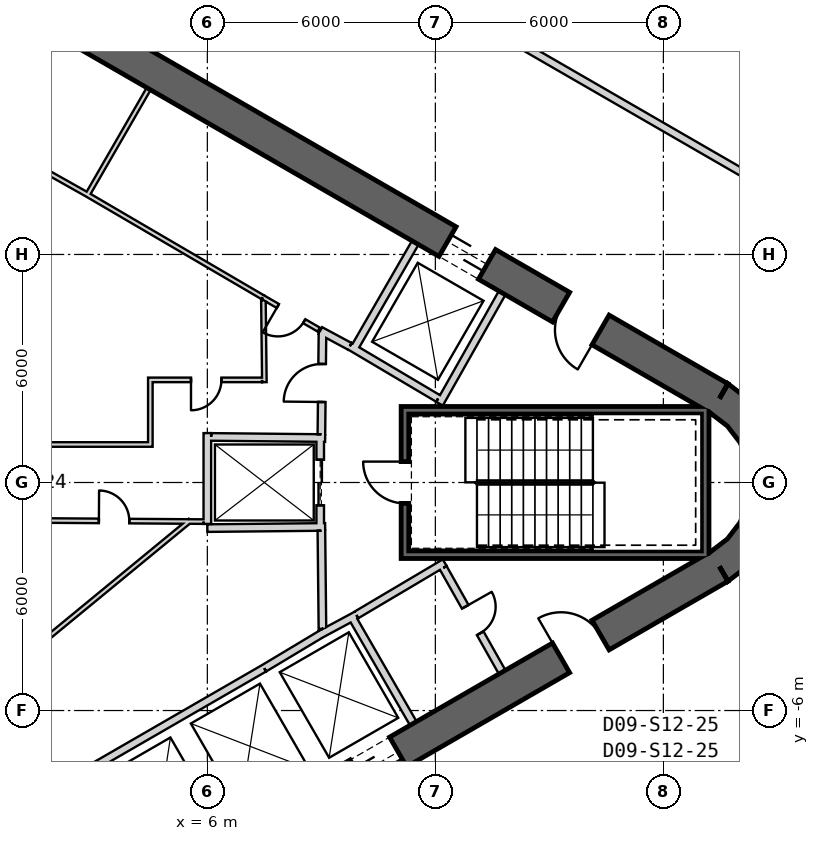
"""IFC4 building model, lengths in metres.
Left out: names, types, materials, properties, quantities, classifications, styles, units other than length and angle.
Written with IfcOpenShell. Run it as: python <this file> out.ifc"""

import sys

from ifc_helpers import new_model, si_unit, direction, frame, frame_2d, origin, place, context, subcontext, project, spatial, polyline, rectangle, outline, extrude, element, fill, save


model = new_model("IFC4")
c1 = context("Model", 3, precision=1e-05, world=origin(), true_north=direction((0.0, 1.0)))
c2 = subcontext(c1, "Body", "Model", "MODEL_VIEW")
j1 = project(units=[si_unit("LENGTHUNIT", "METRE"), si_unit("PLANEANGLEUNIT", "RADIAN")], contexts=[c1])
p1 = place(None, origin())
s1 = spatial("IfcSite", under=j1, at=p1, CompositionType="ELEMENT")
p2 = place(p1, origin())
s2 = spatial("IfcBuilding", under=s1, at=p2, CompositionType="ELEMENT")
p3 = place(p2, frame((0.0, 0.0, 205.2)))
s3 = spatial("IfcBuildingStorey", under=s2, at=p3, CompositionType="ELEMENT", Elevation=205.2)
p4 = place(p3, frame((19.475, 2.208, 0.0), z_axis=(0.0, 0.0, 1.0), x_axis=(-0.866028369851, 0.499994862586, 0.0)))
e1 = element("IfcWall", 1, at=p4, inside=s3, PredefinedType="SHEAR", context=c2, shape_type="SweptSolid", body=[
    extrude(rectangle(XDim=31.523, YDim=0.9, at=frame_2d((15.762, 0.0))), origin(), (0.0, 0.0, 1.0), 4.0),
])
p5 = place(p4, frame((7.062, 0.0, 0.0)))
e2 = element("IfcOpeningElement", 2, at=p5, cuts=e1, PredefinedType="OPENING", context=c2, shape_type="SweptSolid", body=[
    extrude(rectangle(XDim=1.2, YDim=2.4, at=frame_2d((0.6, 1.2))), frame((0.0, 0.46, 0.0), z_axis=(0.0, -1.0, 0.0), x_axis=(1.0, 0.0, 0.0)), (0.0, 0.0, 1.0), 0.92),
])
p6 = place(p4, frame((3.612, 0.0, 0.0)))
e3 = element("IfcOpeningElement", 3, at=p6, cuts=e1, PredefinedType="OPENING", context=c2, shape_type="SweptSolid", body=[
    extrude(rectangle(XDim=1.2, YDim=2.4, at=frame_2d((0.6, 1.2))), frame((0.0, 0.46, 0.0), z_axis=(0.0, -1.0, 0.0), x_axis=(1.0, 0.0, 0.0)), (0.0, 0.0, 1.0), 0.92),
])
p7 = place(p4, frame((26.712, 0.0, 0.0)))
e4 = element("IfcOpeningElement", 4, at=p7, cuts=e1, PredefinedType="OPENING", context=c2, shape_type="SweptSolid", body=[
    extrude(rectangle(XDim=1.2, YDim=2.4, at=frame_2d((0.6, 1.2))), frame((0.0, 0.46, 0.0), z_axis=(0.0, -1.0, 0.0), x_axis=(1.0, 0.0, 0.0)), (0.0, 0.0, 1.0), 0.92),
])
p8 = place(p3, frame((-7.825, -17.97, 0.0), z_axis=(0.0, 0.0, 1.0), x_axis=(0.866028369851, 0.499994862586, 0.0)))
e5 = element("IfcWall", 5, at=p8, inside=s3, PredefinedType="SHEAR", context=c2, shape_type="SweptSolid", body=[
    extrude(rectangle(XDim=31.523, YDim=0.9, at=frame_2d((15.762, 0.0))), origin(), (0.0, 0.0, 1.0), 4.0),
])
p9 = place(p8, frame((7.062, 0.0, 0.0)))
e6 = element("IfcOpeningElement", 6, at=p9, cuts=e5, PredefinedType="OPENING", context=c2, shape_type="SweptSolid", body=[
    extrude(rectangle(XDim=1.2, YDim=2.4, at=frame_2d((0.6, 1.2))), frame((0.0, 0.46, 0.0), z_axis=(0.0, -1.0, 0.0), x_axis=(1.0, 0.0, 0.0)), (0.0, 0.0, 1.0), 0.92),
])
p10 = place(p8, frame((9.762, 0.0, 0.0)))
e7 = element("IfcOpeningElement", 7, at=p10, cuts=e5, PredefinedType="OPENING", context=c2, shape_type="SweptSolid", body=[
    extrude(rectangle(XDim=1.2, YDim=2.4, at=frame_2d((0.6, 1.2))), frame((0.0, 0.46, 0.0), z_axis=(0.0, -1.0, 0.0), x_axis=(1.0, 0.0, 0.0)), (0.0, 0.0, 1.0), 0.92),
])
p11 = place(p8, frame((12.462, 0.0, 0.0)))
e8 = element("IfcOpeningElement", 8, at=p11, cuts=e5, PredefinedType="OPENING", context=c2, shape_type="SweptSolid", body=[
    extrude(rectangle(XDim=1.2, YDim=2.4, at=frame_2d((0.6, 1.2))), frame((0.0, 0.46, 0.0), z_axis=(0.0, -1.0, 0.0), x_axis=(1.0, 0.0, 0.0)), (0.0, 0.0, 1.0), 0.92),
])
p12 = place(p8, frame((15.162, 0.0, 0.0)))
e9 = element("IfcOpeningElement", 9, at=p12, cuts=e5, PredefinedType="OPENING", context=c2, shape_type="SweptSolid", body=[
    extrude(rectangle(XDim=1.2, YDim=2.4, at=frame_2d((0.6, 1.2))), frame((0.0, 0.46, 0.0), z_axis=(0.0, -1.0, 0.0), x_axis=(1.0, 0.0, 0.0)), (0.0, 0.0, 1.0), 0.92),
])
p13 = place(p8, frame((17.862, 0.0, 0.0)))
e10 = element("IfcOpeningElement", 10, at=p13, cuts=e5, PredefinedType="OPENING", context=c2, shape_type="SweptSolid", body=[
    extrude(rectangle(XDim=1.2, YDim=2.4, at=frame_2d((0.6, 1.2))), frame((0.0, 0.46, 0.0), z_axis=(0.0, -1.0, 0.0), x_axis=(1.0, 0.0, 0.0)), (0.0, 0.0, 1.0), 0.92),
])
p14 = place(p8, frame((20.562, 0.0, 0.0)))
e11 = element("IfcOpeningElement", 11, at=p14, cuts=e5, PredefinedType="OPENING", context=c2, shape_type="SweptSolid", body=[
    extrude(rectangle(XDim=1.2, YDim=2.4, at=frame_2d((0.6, 1.2))), frame((0.0, 0.46, 0.0), z_axis=(0.0, -1.0, 0.0), x_axis=(1.0, 0.0, 0.0)), (0.0, 0.0, 1.0), 0.92),
])
p15 = place(p8, frame((26.712, 0.0, 0.0)))
e12 = element("IfcOpeningElement", 12, at=p15, cuts=e5, PredefinedType="OPENING", context=c2, shape_type="SweptSolid", body=[
    extrude(rectangle(XDim=1.2, YDim=2.4, at=frame_2d((0.6, 1.2))), frame((0.0, 0.46, 0.0), z_axis=(0.0, -1.0, 0.0), x_axis=(1.0, 0.0, 0.0)), (0.0, 0.0, 1.0), 0.92),
])
p16 = place(p8, frame((3.612, 0.0, 0.0)))
e13 = element("IfcOpeningElement", 13, at=p16, cuts=e5, PredefinedType="OPENING", context=c2, shape_type="SweptSolid", body=[
    extrude(rectangle(XDim=1.2, YDim=2.4, at=frame_2d((0.6, 1.2))), frame((0.0, 0.46, 0.0), z_axis=(0.0, -1.0, 0.0), x_axis=(1.0, 0.0, 0.0)), (0.0, 0.0, 1.0), 0.92),
])
p17 = place(p3, origin())
e14 = element("IfcWall", 14, at=p17, inside=s3, PredefinedType="SHEAR", context=c2, shape_type="SweptSolid", body=[
    extrude(outline(polyline([(19.7, -2.598), (20.321, -2.121), (20.798, -1.5), (21.098, -0.777), (21.2, 0.0), (21.098, 0.777), (20.798, 1.5), (20.321, 2.121), (19.7, 2.598), (19.25, 1.819), (19.685, 1.485), (20.019, 1.05), (20.229, 0.543), (20.3, 0.0), (20.229, -0.543), (20.019, -1.05), (19.685, -1.485), (19.25, -1.819), (19.7, -2.598)])), origin(), (0.0, 0.0, 1.0), 4.0),
])
p18 = place(p3, frame((9.847, 3.495, 0.0), z_axis=(0.0, 0.0, 1.0), x_axis=(0.499984717929, 0.866034226713, 0.0)))
e15 = element("IfcWall", 15, at=p18, inside=s3, PredefinedType="PLUMBINGWALL", context=c2, shape_type="SweptSolid", body=[
    extrude(rectangle(XDim=3.25, YDim=0.2, at=frame_2d((1.625, 0.0))), origin(), (0.0, 0.0, 1.0), 3.7),
])
p19 = place(p3, frame((12.11, 2.073, 0.0), z_axis=(0.0, 0.0, 1.0), x_axis=(0.49196600604, 0.870614408852, 0.0)))
e16 = element("IfcWall", 16, at=p19, inside=s3, PredefinedType="PLUMBINGWALL", context=c2, shape_type="SweptSolid", body=[
    extrude(rectangle(XDim=3.35, YDim=0.2, at=frame_2d((1.675, 0.0))), origin(), (0.0, 0.0, 1.0), 3.7),
])
p20 = place(p3, frame((12.073, 2.211, 0.0), z_axis=(0.0, 0.0, 1.0), x_axis=(-0.860414880418, 0.509594185166, 0.0)))
e17 = element("IfcWall", 17, at=p20, inside=s3, PredefinedType="PLUMBINGWALL", context=c2, shape_type="SweptSolid", body=[
    extrude(rectangle(XDim=2.7, YDim=0.2, at=frame_2d((1.35, 0.0))), origin(), (0.0, 0.0, 1.0), 3.7),
])
p21 = place(p3, frame((0.483, -8.936, 0.0), z_axis=(0.0, 0.0, 1.0), x_axis=(0.866030989016, 0.499990325971, 0.0)))
e18 = element("IfcWall", 18, at=p21, inside=s3, PredefinedType="PLUMBINGWALL", context=c2, shape_type="SweptSolid", body=[
    extrude(rectangle(XDim=8.1, YDim=0.2, at=frame_2d((4.05, 0.0))), origin(), (0.0, 0.0, 1.0), 3.7),
])
p22 = place(p3, frame((9.795, -3.525, 0.0), z_axis=(0.0, 0.0, 1.0), x_axis=(0.499984717929, -0.866034226713, 0.0)))
e19 = element("IfcWall", 19, at=p22, inside=s3, PredefinedType="PLUMBINGWALL", context=c2, shape_type="SweptSolid", body=[
    extrude(rectangle(XDim=3.25, YDim=0.2, at=frame_2d((1.625, 0.0))), origin(), (0.0, 0.0, 1.0), 3.7),
])
p23 = place(p3, frame((8.974, -3.999, 0.0), z_axis=(0.0, 0.0, 1.0), x_axis=(0.880907015104, 0.473289373154, 0.0)))
e20 = element("IfcWall", 20, at=p23, inside=s3, PredefinedType="PLUMBINGWALL", context=c2, shape_type="SweptSolid", body=[
    extrude(rectangle(XDim=1.078, YDim=0.2, at=frame_2d((0.539, 0.0))), origin(), (0.0, 0.0, 1.0), 3.7),
])
p24 = place(p3, frame((7.497, -4.886, 0.0), z_axis=(0.0, 0.0, 1.0), x_axis=(0.857516281273, 0.51445682749, 0.0)))
e21 = element("IfcWall", 21, at=p24, inside=s3, PredefinedType="PLUMBINGWALL", context=c2, shape_type="SweptSolid", body=[
    extrude(rectangle(XDim=1.845, YDim=0.2, at=frame_2d((0.922, 0.0))), origin(), (0.0, 0.0, 1.0), 3.7),
])
p25 = place(p3, frame((19.2, 1.9, -0.3), z_axis=(0.0, 0.0, 1.0), x_axis=(-1.0, 0.0, 0.0)))
e22 = element("IfcWall", 22, at=p25, inside=s3, PredefinedType="SHEAR", context=c2, shape_type="SweptSolid", body=[
    extrude(rectangle(XDim=8.1, YDim=0.2, at=frame_2d((4.05, 0.0))), origin(), (0.0, 0.0, 1.0), 4.0),
])
p26 = place(p3, frame((19.1, -2.0, -0.3), z_axis=(0.0, 0.0, 1.0), x_axis=(0.0, 1.0, 0.0)))
e23 = element("IfcWall", 23, at=p26, inside=s3, PredefinedType="SHEAR", context=c2, shape_type="SweptSolid", body=[
    extrude(rectangle(XDim=3.8, YDim=0.2, at=frame_2d((1.9, 0.0))), origin(), (0.0, 0.0, 1.0), 4.0),
])
p27 = place(p3, frame((11.1, -1.9, -0.3), z_axis=(0.0, 0.0, 1.0), x_axis=(1.0, 0.0, 0.0)))
e24 = element("IfcWall", 24, at=p27, inside=s3, PredefinedType="SHEAR", context=c2, shape_type="SweptSolid", body=[
    extrude(rectangle(XDim=7.9, YDim=0.2, at=frame_2d((3.95, 0.0))), origin(), (0.0, 0.0, 1.0), 4.0),
])
p28 = place(p3, frame((11.2, -1.8, -0.3), z_axis=(0.0, 0.0, 1.0), x_axis=(0.0, 1.0, 0.0)))
e25 = element("IfcWall", 25, at=p28, inside=s3, PredefinedType="SHEAR", context=c2, shape_type="SweptSolid", body=[
    extrude(rectangle(XDim=3.6, YDim=0.2, at=frame_2d((1.8, 0.0))), origin(), (0.0, 0.0, 1.0), 4.0),
])
p29 = place(p28, frame((1.25, 0.0, 0.3)))
e26 = element("IfcOpeningElement", 26, at=p29, cuts=e25, PredefinedType="OPENING", context=c2, shape_type="SweptSolid", body=[
    extrude(rectangle(XDim=1.1, YDim=2.1, at=frame_2d((0.55, 1.05))), frame((0.0, 0.11, 0.0), z_axis=(0.0, -1.0, 0.0), x_axis=(1.0, 0.0, 0.0)), (0.0, 0.0, 1.0), 0.22),
])
p30 = place(p3, frame((8.97, 1.2, 0.0), z_axis=(0.0, 0.0, 1.0), x_axis=(0.0, -1.0, 0.0)))
e27 = element("IfcWall", 27, at=p30, inside=s3, PredefinedType="PLUMBINGWALL", context=c2, shape_type="SweptSolid", body=[
    extrude(rectangle(XDim=2.4, YDim=0.2, at=frame_2d((1.2, 0.0))), origin(), (0.0, 0.0, 1.0), 3.7),
])
p31 = place(p30, frame((0.6, 0.0, 0.0)))
e28 = element("IfcOpeningElement", 28, at=p31, cuts=e27, PredefinedType="OPENING", context=c2, shape_type="SweptSolid", body=[
    extrude(rectangle(XDim=1.2, YDim=2.4, at=frame_2d((0.6, 1.2))), frame((0.0, 0.11, 0.0), z_axis=(0.0, -1.0, 0.0), x_axis=(1.0, 0.0, 0.0)), (0.0, 0.0, 1.0), 0.22),
])
p32 = place(p3, frame((9.1, -1.169, 0.0), z_axis=(0.0, 0.0, 1.0), x_axis=(-0.999949988, -0.010001074852, 0.0)))
e29 = element("IfcWall", 29, at=p32, inside=s3, PredefinedType="PLUMBINGWALL", context=c2, shape_type="SweptSolid", body=[
    extrude(rectangle(XDim=3.1, YDim=0.2, at=frame_2d((1.55, 0.0))), origin(), (0.0, 0.0, 1.0), 3.7),
])
p33 = place(p3, frame((6.0, -1.09, 0.0), z_axis=(0.0, 0.0, 1.0), x_axis=(0.0, 1.0, 0.0)))
e30 = element("IfcWall", 30, at=p33, inside=s3, PredefinedType="PLUMBINGWALL", context=c2, shape_type="SweptSolid", body=[
    extrude(rectangle(XDim=2.39, YDim=0.2, at=frame_2d((1.195, 0.0))), origin(), (0.0, 0.0, 1.0), 3.7),
])
p34 = place(p3, frame((9.1, 1.169, 0.0), z_axis=(0.0, 0.0, 1.0), x_axis=(-0.99994990606, 0.010009264196, 0.0)))
e31 = element("IfcWall", 31, at=p34, inside=s3, PredefinedType="PLUMBINGWALL", context=c2, shape_type="SweptSolid", body=[
    extrude(rectangle(XDim=3.0, YDim=0.2, at=frame_2d((1.5, 0.0))), origin(), (0.0, 0.0, 1.0), 3.7),
])
p35 = place(p3, frame((4.457, 10.359, 0.0), z_axis=(0.0, 0.0, 1.0), x_axis=(-0.500017246033, -0.866015446554, 0.0)))
e32 = element("IfcWall", 32, at=p35, inside=s3, PredefinedType="PARTITIONING", context=c2, shape_type="SweptSolid", body=[
    extrude(rectangle(XDim=3.25, YDim=0.12, at=frame_2d((1.625, 0.0))), origin(), (0.0, 0.0, 1.0), 3.7),
])
p36 = place(p3, frame((8.974, 3.999, 0.0), z_axis=(0.0, 0.0, 1.0), x_axis=(0.880917147855, -0.473270513147, 0.0)))
e33 = element("IfcWall", 33, at=p36, inside=s3, PredefinedType="PARTITIONING", context=c2, shape_type="SweptSolid", body=[
    extrude(rectangle(XDim=0.878, YDim=0.2, at=frame_2d((0.439, 0.0))), origin(), (0.0, 0.0, 1.0), 3.7),
])
p37 = place(p3, frame((7.457, 4.875, 0.0), z_axis=(0.0, 0.0, 1.0), x_axis=(-0.863262357411, 0.504755487615, 0.0)))
e34 = element("IfcWall", 34, at=p37, inside=s3, PredefinedType="PARTITIONING", context=c2, shape_type="SweptSolid", body=[
    extrude(rectangle(XDim=5.37, YDim=0.12, at=frame_2d((2.685, 0.0))), origin(), (0.0, 0.0, 1.0), 3.7),
])
p38 = place(p3, frame((7.457, 4.875, 0.0), z_axis=(0.0, 0.0, 1.0), x_axis=(0.866027945518, -0.499995597562, 0.0)))
e35 = element("IfcWall", 35, at=p38, inside=s3, PredefinedType="PARTITIONING", context=c2, shape_type="SweptSolid", body=[
    extrude(rectangle(XDim=1.702, YDim=0.12, at=frame_2d((0.851, 0.0))), origin(), (0.0, 0.0, 1.0), 3.7),
])
p39 = place(p38, frame((0.461, 0.0, 0.0)))
e36 = element("IfcOpeningElement", 36, at=p39, cuts=e35, PredefinedType="OPENING", context=c2, shape_type="SweptSolid", body=[
    extrude(rectangle(XDim=0.8, YDim=2.1, at=frame_2d((0.4, 1.05))), frame((0.0, 0.07, 0.0), z_axis=(0.0, -1.0, 0.0), x_axis=(1.0, 0.0, 0.0)), (0.0, 0.0, 1.0), 0.14),
])
p40 = place(p3, frame((2.821, 7.586, 0.0), z_axis=(0.0, 0.0, 1.0), x_axis=(-0.871426548871, 0.490526013503, 0.0)))
e37 = element("IfcWall", 37, at=p40, inside=s3, PredefinedType="PARTITIONING", context=c2, shape_type="SweptSolid", body=[
    extrude(rectangle(XDim=2.67, YDim=0.12, at=frame_2d((1.335, 0.0))), origin(), (0.0, 0.0, 1.0), 3.7),
])
p41 = place(p3, frame((12.245, -2.109, 0.0), z_axis=(0.0, 0.0, 1.0), x_axis=(-0.860414880418, -0.509594185166, 0.0)))
e38 = element("IfcWall", 38, at=p41, inside=s3, PredefinedType="PARTITIONING", context=c2, shape_type="SweptSolid", body=[
    extrude(rectangle(XDim=2.7, YDim=0.2, at=frame_2d((1.35, 0.0))), origin(), (0.0, 0.0, 1.0), 3.7),
])
p42 = place(p3, frame((13.758, -4.99, 0.0), z_axis=(0.0, 0.0, 1.0), x_axis=(-0.491993409184, 0.87059892334, 0.0)))
e39 = element("IfcWall", 39, at=p42, inside=s3, PredefinedType="PARTITIONING", context=c2, shape_type="SweptSolid", body=[
    extrude(rectangle(XDim=3.15, YDim=0.2, at=frame_2d((1.575, 0.0))), origin(), (0.0, 0.0, 1.0), 3.7),
])
p43 = place(p42, frame((1.175, 0.0, 0.0)))
e40 = element("IfcOpeningElement", 40, at=p43, cuts=e39, PredefinedType="OPENING", context=c2, shape_type="SweptSolid", body=[
    extrude(rectangle(XDim=0.8, YDim=2.1, at=frame_2d((0.4, 1.05))), frame((0.0, 0.11, 0.0), z_axis=(0.0, -1.0, 0.0), x_axis=(1.0, 0.0, 0.0)), (0.0, 0.0, 1.0), 0.22),
])
p44 = place(p3, frame((9.029, -3.851, 0.0), z_axis=(0.0, 0.0, 1.0), x_axis=(-0.010784614026, 0.999941844359, 0.0)))
e41 = element("IfcWall", 41, at=p44, inside=s3, PredefinedType="PARTITIONING", context=c2, shape_type="SweptSolid", body=[
    extrude(rectangle(XDim=2.581, YDim=0.2, at=frame_2d((1.291, 0.0))), origin(), (0.0, 0.0, 1.0), 3.7),
])
p45 = place(p3, frame((9.001, 1.27, 0.0), z_axis=(0.0, 0.0, 1.0), x_axis=(0.010723968736, 0.999942496594, 0.0)))
e42 = element("IfcWall", 42, at=p45, inside=s3, PredefinedType="PARTITIONING", context=c2, shape_type="SweptSolid", body=[
    extrude(rectangle(XDim=2.709, YDim=0.2, at=frame_2d((1.354, 0.0))), origin(), (0.0, 0.0, 1.0), 3.7),
])
p46 = place(p45, frame((0.848, 0.0, 0.0)))
e43 = element("IfcOpeningElement", 43, at=p46, cuts=e42, PredefinedType="OPENING", context=c2, shape_type="SweptSolid", body=[
    extrude(rectangle(XDim=1.0, YDim=2.1, at=frame_2d((0.5, 1.05))), frame((0.0, 0.11, 0.0), z_axis=(0.0, -1.0, 0.0), x_axis=(1.0, 0.0, 0.0)), (0.0, 0.0, 1.0), 0.22),
])
p47 = place(p3, frame((5.548, -1.0, 0.0), z_axis=(0.0, 0.0, 1.0), x_axis=(-0.772345431507, -0.635202750648, 0.0)))
e44 = element("IfcWall", 44, at=p47, inside=s3, PredefinedType="PARTITIONING", context=c2, shape_type="SweptSolid", body=[
    extrude(rectangle(XDim=7.415, YDim=0.12, at=frame_2d((3.707, 0.0))), origin(), (0.0, 0.0, 1.0), 3.7),
])
p48 = place(p3, frame((5.9, -1.029, 0.0), z_axis=(0.0, 0.0, 1.0), x_axis=(-0.999977012451, 0.006780454946, 0.0)))
e45 = element("IfcWall", 45, at=p48, inside=s3, PredefinedType="PARTITIONING", context=c2, shape_type="SweptSolid", body=[
    extrude(rectangle(XDim=4.357, YDim=0.12, at=frame_2d((2.178, 0.0))), origin(), (0.0, 0.0, 1.0), 3.7),
])
p49 = place(p48, frame((1.954, 0.0, 0.0)))
e46 = element("IfcOpeningElement", 46, at=p49, cuts=e45, PredefinedType="OPENING", context=c2, shape_type="SweptSolid", body=[
    extrude(rectangle(XDim=0.8, YDim=2.1, at=frame_2d((0.4, 1.05))), frame((0.0, 0.07, 0.0), z_axis=(0.0, -1.0, 0.0), x_axis=(1.0, 0.0, 0.0)), (0.0, 0.0, 1.0), 0.14),
])
p50 = place(p3, frame((7.501, 2.64, 0.0), z_axis=(0.0, 0.0, 1.0), x_axis=(-0.01178388431, 0.999930567625, 0.0)))
e47 = element("IfcWall", 47, at=p50, inside=s3, PredefinedType="PARTITIONING", context=c2, shape_type="SweptSolid", body=[
    extrude(rectangle(XDim=2.155, YDim=0.12, at=frame_2d((1.077, 0.0))), origin(), (0.0, 0.0, 1.0), 3.7),
])
p51 = place(p3, frame((4.44, 2.7, 0.0), z_axis=(0.0, 0.0, 1.0), x_axis=(1.0, 0.0, 0.0)))
e48 = element("IfcWall", 48, at=p51, inside=s3, PredefinedType="PARTITIONING", context=c2, shape_type="SweptSolid", body=[
    extrude(rectangle(XDim=3.0, YDim=0.12, at=frame_2d((1.5, 0.0))), origin(), (0.0, 0.0, 1.0), 3.7),
])
p52 = place(p51, frame((1.13, 0.0, 0.0)))
e49 = element("IfcOpeningElement", 49, at=p52, cuts=e48, PredefinedType="OPENING", context=c2, shape_type="SweptSolid", body=[
    extrude(rectangle(XDim=0.8, YDim=2.1, at=frame_2d((0.4, 1.05))), frame((0.0, 0.07, 0.0), z_axis=(0.0, -1.0, 0.0), x_axis=(1.0, 0.0, 0.0)), (0.0, 0.0, 1.0), 0.14),
])
p53 = place(p3, frame((4.5, 0.94, 0.0), z_axis=(0.0, 0.0, 1.0), x_axis=(0.0, 1.0, 0.0)))
e50 = element("IfcWall", 50, at=p53, inside=s3, PredefinedType="PARTITIONING", context=c2, shape_type="SweptSolid", body=[
    extrude(rectangle(XDim=1.7, YDim=0.12, at=frame_2d((0.85, 0.0))), origin(), (0.0, 0.0, 1.0), 3.7),
])
p54 = place(p3, frame((1.542, 1.0, 0.0), z_axis=(0.0, 0.0, 1.0), x_axis=(1.0, 0.0, 0.0)))
e51 = element("IfcWall", 51, at=p54, inside=s3, PredefinedType="PARTITIONING", context=c2, shape_type="SweptSolid", body=[
    extrude(rectangle(XDim=2.898, YDim=0.12, at=frame_2d((1.449, 0.0))), origin(), (0.0, 0.0, 1.0), 3.7),
])
p55 = place(p3, frame((23.119, 6.398, 0.0), z_axis=(0.0, 0.0, 1.0), x_axis=(-0.866027034507, 0.499997175495, 0.0)))
e52 = element("IfcWall", 52, at=p55, inside=s3, PredefinedType="PARTITIONING", context=c2, shape_type="SweptSolid", body=[
    extrude(rectangle(XDim=18.873, YDim=0.2, at=frame_2d((9.436, 0.0))), origin(), (0.0, 0.0, 1.0), 2.88),
])
p56 = place(p29, origin())
e53 = element("IfcDoor", 53, at=p56, inside=s3, OperationType="SINGLE_SWING_RIGHT", PredefinedType="USERDEFINED", context=c2, shape_type="SweptSolid", body=[
    extrude(rectangle(XDim=1.1, YDim=2.1, at=frame_2d((0.55, 1.05))), frame((0.0, 0.025, 0.0), z_axis=(0.0, -1.0, 0.0), x_axis=(1.0, 0.0, 0.0)), (0.0, 0.0, 1.0), 0.05),
])
fill(e26, e53)
p57 = place(p46, origin())
e54 = element("IfcDoor", 54, at=p57, inside=s3, OperationType="SINGLE_SWING_LEFT", PredefinedType="USERDEFINED", context=c2, shape_type="SweptSolid", body=[
    extrude(rectangle(XDim=1.0, YDim=2.1, at=frame_2d((0.5, 1.05))), frame((0.0, 0.025, 0.0), z_axis=(0.0, -1.0, 0.0), x_axis=(1.0, 0.0, 0.0)), (0.0, 0.0, 1.0), 0.05),
])
fill(e43, e54)
p58 = place(p31, origin())
e55 = element("IfcDoor", 55, at=p58, inside=s3, OperationType="SLIDING_TO_LEFT", PredefinedType="USERDEFINED", context=c2, shape_type="SweptSolid", body=[
    extrude(rectangle(XDim=1.2, YDim=2.4, at=frame_2d((0.6, 1.2))), frame((0.0, 0.025, 0.0), z_axis=(0.0, -1.0, 0.0), x_axis=(1.0, 0.0, 0.0)), (0.0, 0.0, 1.0), 0.05),
])
fill(e28, e55)
p59 = place(p49, origin())
e56 = element("IfcDoor", 56, at=p59, inside=s3, OperationType="SINGLE_SWING_LEFT", PredefinedType="USERDEFINED", context=c2, shape_type="SweptSolid", body=[
    extrude(rectangle(XDim=0.8, YDim=2.1, at=frame_2d((0.4, 1.05))), frame((0.0, 0.025, 0.0), z_axis=(0.0, -1.0, 0.0), x_axis=(1.0, 0.0, 0.0)), (0.0, 0.0, 1.0), 0.05),
])
fill(e46, e56)
p60 = place(p52, origin())
e57 = element("IfcDoor", 57, at=p60, inside=s3, OperationType="SINGLE_SWING_RIGHT", PredefinedType="USERDEFINED", context=c2, shape_type="SweptSolid", body=[
    extrude(rectangle(XDim=0.8, YDim=2.1, at=frame_2d((0.4, 1.05))), frame((0.0, 0.025, 0.0), z_axis=(0.0, -1.0, 0.0), x_axis=(1.0, 0.0, 0.0)), (0.0, 0.0, 1.0), 0.05),
])
fill(e49, e57)
p61 = place(p39, origin())
e58 = element("IfcDoor", 58, at=p61, inside=s3, OperationType="SINGLE_SWING_RIGHT", PredefinedType="USERDEFINED", context=c2, shape_type="SweptSolid", body=[
    extrude(rectangle(XDim=0.8, YDim=2.1, at=frame_2d((0.4, 1.05))), frame((0.0, 0.025, 0.0), z_axis=(0.0, -1.0, 0.0), x_axis=(1.0, 0.0, 0.0)), (0.0, 0.0, 1.0), 0.05),
])
fill(e36, e58)
p62 = place(p43, origin())
e59 = element("IfcDoor", 59, at=p62, inside=s3, OperationType="SINGLE_SWING_RIGHT", PredefinedType="USERDEFINED", context=c2, shape_type="SweptSolid", body=[
    extrude(rectangle(XDim=0.8, YDim=2.1, at=frame_2d((0.4, 1.05))), frame((0.0, 0.025, 0.0), z_axis=(0.0, -1.0, 0.0), x_axis=(1.0, 0.0, 0.0)), (0.0, 0.0, 1.0), 0.05),
])
fill(e40, e59)
p63 = place(p5, origin())
e60 = element("IfcDoor", 60, at=p63, inside=s3, OperationType="SLIDING_TO_LEFT", PredefinedType="USERDEFINED", context=c2, shape_type="SweptSolid", body=[
    extrude(rectangle(XDim=1.2, YDim=2.4, at=frame_2d((0.6, 1.2))), frame((0.0, 0.025, 0.0), z_axis=(0.0, -1.0, 0.0), x_axis=(1.0, 0.0, 0.0)), (0.0, 0.0, 1.0), 0.05),
])
fill(e2, e60)
p64 = place(p14, origin())
e61 = element("IfcDoor", 61, at=p64, inside=s3, OperationType="SLIDING_TO_LEFT", PredefinedType="USERDEFINED", context=c2, shape_type="SweptSolid", body=[
    extrude(rectangle(XDim=1.2, YDim=2.4, at=frame_2d((0.6, 1.2))), frame((0.0, 0.025, 0.0), z_axis=(0.0, -1.0, 0.0), x_axis=(1.0, 0.0, 0.0)), (0.0, 0.0, 1.0), 0.05),
])
fill(e11, e61)
p65 = place(p15, origin())
e62 = element("IfcDoor", 62, at=p65, inside=s3, OperationType="SINGLE_SWING_RIGHT", PredefinedType="USERDEFINED", context=c2, shape_type="SweptSolid", body=[
    extrude(rectangle(XDim=1.2, YDim=2.4, at=frame_2d((0.6, 1.2))), frame((0.0, 0.025, 0.0), z_axis=(0.0, -1.0, 0.0), x_axis=(1.0, 0.0, 0.0)), (0.0, 0.0, 1.0), 0.05),
])
fill(e12, e62)
p66 = place(p6, origin())
e63 = element("IfcDoor", 63, at=p66, inside=s3, OperationType="SINGLE_SWING_RIGHT", PredefinedType="USERDEFINED", context=c2, shape_type="SweptSolid", body=[
    extrude(rectangle(XDim=1.2, YDim=2.4, at=frame_2d((0.6, 1.2))), frame((0.0, 0.025, 0.0), z_axis=(0.0, -1.0, 0.0), x_axis=(1.0, 0.0, 0.0)), (0.0, 0.0, 1.0), 0.05),
])
fill(e3, e63)
save(model, sys.argv[1])
